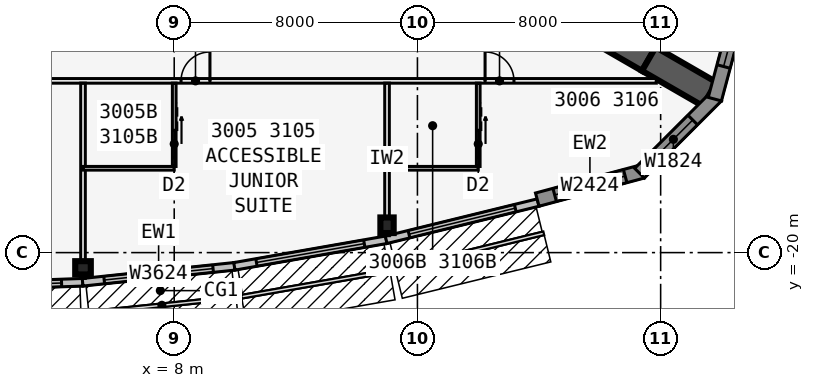
"""IFC4 building model, lengths in metres.
Left out: names, types, materials, properties, quantities, classifications, styles, units other than length and angle.
Written with IfcOpenShell. Run it as: python <this file> out.ifc"""

import sys

from ifc_helpers import new_model, si_unit, direction, frame, frame_2d, origin, origin_2d, place, context, subcontext, project, spatial, polyline, rectangle, i_section, outline, extrude, element, fill, save


model = new_model("IFC4")
c1 = context("Model", 3, precision=1e-05, world=origin(), true_north=direction((0.0, 1.0)))
c2 = subcontext(c1, "Body", "Model", "MODEL_VIEW")
j1 = project(units=[si_unit("LENGTHUNIT", "METRE"), si_unit("PLANEANGLEUNIT", "RADIAN")], contexts=[c1])
p1 = place(None, origin())
s1 = spatial("IfcSite", under=j1, at=p1, CompositionType="ELEMENT")
p2 = place(p1, origin())
s2 = spatial("IfcBuilding", under=s1, at=p2, CompositionType="ELEMENT")
p3 = place(p2, frame((0.0, 0.0, 118.1)))
s3 = spatial("IfcBuildingStorey", under=s2, at=p3, CompositionType="ELEMENT", Elevation=118.1)
for number, where, z_axis, x_axis in (
    (1, (21.61, -12.477, 0.0), (0.0, 0.0, 1.0), (0.866, -0.5, 0.0)),
    (2, (23.61, -13.631, 0.0), (0.0, 0.0, 1.0), (0.866, -0.5, 0.0)),
):
    element("IfcWall", number, at=place(p3, frame(where, z_axis=z_axis, x_axis=x_axis)), inside=s3, PredefinedType="SHEAR", context=c2, shape_type="SweptSolid", body=[
        extrude(rectangle(XDim=2.309, YDim=0.9, at=frame_2d((1.155, 0.0))), origin(), (0.0, 0.0, 1.0), 3.4),
    ])
for number, where, z_axis, x_axis in (
    (3, (5.0, -20.5, 0.0), (0.0, 0.0, 1.0), (0.0, -1.0, 0.0)),
    (4, (15.0, -19.1, 0.0), (0.0, 0.0, 1.0), (1.0, 0.0, 0.0)),
):
    element("IfcColumn", number, at=place(p3, frame(where, z_axis=z_axis, x_axis=x_axis)), inside=s3, PredefinedType="COLUMN", context=c2, shape_type="SweptSolid", body=[
        extrude(i_section(OverallWidth=0.437, OverallDepth=0.513, WebThickness=0.061, FlangeThickness=0.097, at=origin_2d()), origin(), (0.0, 0.0, 1.0), 3.4),
    ])
p4 = place(p3, frame((-0.004, -21.15, 0.0), z_axis=(0.0, 0.0, 1.0), x_axis=(0.999387720943, 0.034988329879, 0.0)))
e5 = element("IfcWall", 5, at=p4, inside=s3, PredefinedType="STANDARD", context=c2, shape_type="SweptSolid", body=[
    extrude(rectangle(XDim=5.003, YDim=0.25, at=frame_2d((2.501, 0.0))), origin(), (0.0, 0.0, 1.0), 3.235),
])
p5 = place(p4, frame((0.701, 0.0, 0.45)))
e6 = element("IfcOpeningElement", 6, at=p5, cuts=e5, PredefinedType="OPENING", context=c2, shape_type="SweptSolid", body=[
    extrude(rectangle(XDim=3.6, YDim=2.4, at=frame_2d((1.8, 1.2))), frame((0.0, 0.135, 0.0), z_axis=(0.0, -1.0, 0.0), x_axis=(1.0, 0.0, 0.0)), (0.0, 0.0, 1.0), 0.27),
])
p6 = place(p3, frame((4.987, -20.976, 0.0), z_axis=(0.0, 0.0, 1.0), x_axis=(0.994534683851, 0.104406717299, 0.0)))
e7 = element("IfcWall", 7, at=p6, inside=s3, PredefinedType="STANDARD", context=c2, shape_type="SweptSolid", body=[
    extrude(rectangle(XDim=5.028, YDim=0.25, at=frame_2d((2.514, 0.0))), origin(), (0.0, 0.0, 1.0), 3.235),
])
p7 = place(p6, frame((0.714, 0.0, 0.45)))
e8 = element("IfcOpeningElement", 8, at=p7, cuts=e7, PredefinedType="OPENING", context=c2, shape_type="SweptSolid", body=[
    extrude(rectangle(XDim=3.6, YDim=2.4, at=frame_2d((1.8, 1.2))), frame((0.0, 0.135, 0.0), z_axis=(0.0, -1.0, 0.0), x_axis=(1.0, 0.0, 0.0)), (0.0, 0.0, 1.0), 0.27),
])
p8 = place(p3, frame((9.979, -20.452, 0.0), z_axis=(0.0, 0.0, 1.0), x_axis=(0.985030467156, 0.172380331752, 0.0)))
e9 = element("IfcWall", 9, at=p8, inside=s3, PredefinedType="STANDARD", context=c2, shape_type="SweptSolid", body=[
    extrude(rectangle(XDim=5.076, YDim=0.25, at=frame_2d((2.538, 0.0))), origin(), (0.0, 0.0, 1.0), 3.235),
])
p9 = place(p8, frame((0.738, 0.0, 0.45)))
e10 = element("IfcOpeningElement", 10, at=p9, cuts=e9, PredefinedType="OPENING", context=c2, shape_type="SweptSolid", body=[
    extrude(rectangle(XDim=3.6, YDim=2.4, at=frame_2d((1.8, 1.2))), frame((0.0, 0.135, 0.0), z_axis=(0.0, -1.0, 0.0), x_axis=(1.0, 0.0, 0.0)), (0.0, 0.0, 1.0), 0.27),
])
p10 = place(p3, frame((14.97, -19.579, 0.0), z_axis=(0.0, 0.0, 1.0), x_axis=(0.971270024053, 0.237980126011, 0.0)))
e11 = element("IfcWall", 11, at=p10, inside=s3, PredefinedType="STANDARD", context=c2, shape_type="SweptSolid", body=[
    extrude(rectangle(XDim=5.148, YDim=0.25, at=frame_2d((2.574, 0.0))), origin(), (0.0, 0.0, 1.0), 3.235),
])
p11 = place(p10, frame((0.774, 0.0, 0.45)))
e12 = element("IfcOpeningElement", 12, at=p11, cuts=e11, PredefinedType="OPENING", context=c2, shape_type="SweptSolid", body=[
    extrude(rectangle(XDim=3.6, YDim=2.4, at=frame_2d((1.8, 1.2))), frame((0.0, 0.135, 0.0), z_axis=(0.0, -1.0, 0.0), x_axis=(1.0, 0.0, 0.0)), (0.0, 0.0, 1.0), 0.27),
])
p12 = place(p3, frame((19.942, -18.258, 0.0), z_axis=(0.0, 0.0, 1.0), x_axis=(0.965924653531, 0.258823421857, 0.0)))
e13 = element("IfcWall", 13, at=p12, inside=s3, PredefinedType="SOLIDWALL", context=c2, shape_type="SweptSolid", body=[
    extrude(rectangle(XDim=3.586, YDim=0.45, at=frame_2d((1.793, 0.0))), origin(), (0.0, 0.0, 1.0), 3.235),
])
p13 = place(p12, frame((0.593, 0.0, 0.45)))
e14 = element("IfcOpeningElement", 14, at=p13, cuts=e13, PredefinedType="OPENING", context=c2, shape_type="SweptSolid", body=[
    extrude(rectangle(XDim=2.4, YDim=2.4, at=frame_2d((1.2, 1.2))), frame((0.0, 0.235, 0.0), z_axis=(0.0, -1.0, 0.0), x_axis=(1.0, 0.0, 0.0)), (0.0, 0.0, 1.0), 0.47),
])
p14 = place(p3, frame((23.305, -17.388, 0.0), z_axis=(0.0, 0.0, 1.0), x_axis=(0.707106781187, 0.707106781187, 0.0)))
e15 = element("IfcWall", 15, at=p14, inside=s3, PredefinedType="SOLIDWALL", context=c2, shape_type="SweptSolid", body=[
    extrude(outline(polyline([(3.586, 0.225), (3.527, 0.225), (3.035, 0.093), (3.0, 0.225), (0.0, 0.225), (0.0, -0.225), (3.586, -0.225), (3.586, 0.225)])), origin(), (0.0, 0.0, 1.0), 3.235),
])
p15 = place(p14, frame((0.675, 0.0, 0.45)))
e16 = element("IfcOpeningElement", 16, at=p15, cuts=e15, PredefinedType="OPENING", context=c2, shape_type="SweptSolid", body=[
    extrude(rectangle(XDim=1.8, YDim=2.4, at=frame_2d((0.9, 1.2))), frame((0.0, 0.235, 0.0), z_axis=(0.0, -1.0, 0.0), x_axis=(1.0, 0.0, 0.0)), (0.0, 0.0, 1.0), 0.47),
])
p16 = place(p3, frame((25.783, -14.953, 0.0), z_axis=(0.0, 0.0, 1.0), x_axis=(0.258823421857, 0.965924653531, 0.0)))
e17 = element("IfcWall", 17, at=p16, inside=s3, PredefinedType="SOLIDWALL", context=c2, shape_type="SweptSolid", body=[
    extrude(outline(polyline([(3.586, 0.225), (0.586, 0.225), (0.551, 0.093), (0.06, 0.225), (0.0, 0.225), (0.0, -0.225), (3.586, -0.225), (3.586, 0.225)])), origin(), (0.0, 0.0, 1.0), 3.235),
])
p17 = place(p16, frame((1.111, 0.0, 0.45)))
e18 = element("IfcOpeningElement", 18, at=p17, cuts=e17, PredefinedType="OPENING", context=c2, shape_type="SweptSolid", body=[
    extrude(rectangle(XDim=1.8, YDim=2.4, at=frame_2d((0.9, 1.2))), frame((0.0, 0.235, 0.0), z_axis=(0.0, -1.0, 0.0), x_axis=(1.0, 0.0, 0.0)), (0.0, 0.0, 1.0), 0.47),
])
p18 = place(p3, frame((-23.857, -14.351, 0.0), z_axis=(0.0, 0.0, 1.0), x_axis=(1.0, 0.0, 0.0)))
e19 = element("IfcWall", 19, at=p18, inside=s3, PredefinedType="PARTITIONING", context=c2, shape_type="SweptSolid", body=[
    extrude(rectangle(XDim=47.714, YDim=0.15, at=frame_2d((23.857, 0.0))), origin(), (0.0, 0.0, 1.0), 3.235),
])
p19 = place(p18, frame((4.682, 0.0, 0.0)))
e20 = element("IfcOpeningElement", 20, at=p19, cuts=e19, PredefinedType="OPENING", context=c2, shape_type="SweptSolid", body=[
    extrude(rectangle(XDim=0.95, YDim=2.13, at=frame_2d((0.475, 1.065))), frame((0.0, 0.085, 0.0), z_axis=(0.0, -1.0, 0.0), x_axis=(1.0, 0.0, 0.0)), (0.0, 0.0, 1.0), 0.17),
])
p20 = place(p18, frame((11.482, 0.0, 0.0)))
e21 = element("IfcOpeningElement", 21, at=p20, cuts=e19, PredefinedType="OPENING", context=c2, shape_type="SweptSolid", body=[
    extrude(rectangle(XDim=0.95, YDim=2.13, at=frame_2d((0.475, 1.065))), frame((0.0, 0.085, 0.0), z_axis=(0.0, -1.0, 0.0), x_axis=(1.0, 0.0, 0.0)), (0.0, 0.0, 1.0), 0.17),
])
p21 = place(p18, frame((16.482, 0.0, 0.0)))
e22 = element("IfcOpeningElement", 22, at=p21, cuts=e19, PredefinedType="OPENING", context=c2, shape_type="SweptSolid", body=[
    extrude(rectangle(XDim=0.95, YDim=2.13, at=frame_2d((0.475, 1.065))), frame((0.0, 0.085, 0.0), z_axis=(0.0, -1.0, 0.0), x_axis=(1.0, 0.0, 0.0)), (0.0, 0.0, 1.0), 0.17),
])
p22 = place(p18, frame((21.482, 0.0, 0.0)))
e23 = element("IfcOpeningElement", 23, at=p22, cuts=e19, PredefinedType="OPENING", context=c2, shape_type="SweptSolid", body=[
    extrude(rectangle(XDim=0.95, YDim=2.13, at=frame_2d((0.475, 1.065))), frame((0.0, 0.085, 0.0), z_axis=(0.0, -1.0, 0.0), x_axis=(1.0, 0.0, 0.0)), (0.0, 0.0, 1.0), 0.17),
])
p23 = place(p18, frame((25.857, 0.0, 0.0)))
e24 = element("IfcOpeningElement", 24, at=p23, cuts=e19, PredefinedType="OPENING", context=c2, shape_type="SweptSolid", body=[
    extrude(rectangle(XDim=1.0, YDim=2.13, at=frame_2d((0.5, 1.065))), frame((0.0, 0.085, 0.0), z_axis=(0.0, -1.0, 0.0), x_axis=(1.0, 0.0, 0.0)), (0.0, 0.0, 1.0), 0.17),
])
p24 = place(p18, frame((32.082, 0.0, 0.0)))
e25 = element("IfcOpeningElement", 25, at=p24, cuts=e19, PredefinedType="OPENING", context=c2, shape_type="SweptSolid", body=[
    extrude(rectangle(XDim=0.95, YDim=2.13, at=frame_2d((0.475, 1.065))), frame((0.0, 0.085, 0.0), z_axis=(0.0, -1.0, 0.0), x_axis=(1.0, 0.0, 0.0)), (0.0, 0.0, 1.0), 0.17),
])
p25 = place(p18, frame((42.082, 0.0, 0.0)))
e26 = element("IfcOpeningElement", 26, at=p25, cuts=e19, PredefinedType="OPENING", context=c2, shape_type="SweptSolid", body=[
    extrude(rectangle(XDim=0.95, YDim=2.13, at=frame_2d((0.475, 1.065))), frame((0.0, 0.085, 0.0), z_axis=(0.0, -1.0, 0.0), x_axis=(1.0, 0.0, 0.0)), (0.0, 0.0, 1.0), 0.17),
])
p26 = place(p3, frame((5.0, -14.426, 0.0), z_axis=(0.0, 0.0, 1.0), x_axis=(0.0, -1.0, 0.0)))
e27 = element("IfcWall", 27, at=p26, inside=s3, PredefinedType="PARTITIONING", context=c2, shape_type="SweptSolid", body=[
    extrude(rectangle(XDim=6.423, YDim=0.15, at=frame_2d((3.211, 0.0))), origin(), (0.0, 0.0, 1.0), 2.389),
])
p27 = place(p3, frame((15.0, -14.426, 0.0), z_axis=(0.0, 0.0, 1.0), x_axis=(0.0, -1.0, 0.0)))
e28 = element("IfcWall", 28, at=p27, inside=s3, PredefinedType="PARTITIONING", context=c2, shape_type="SweptSolid", body=[
    extrude(rectangle(XDim=5.017, YDim=0.15, at=frame_2d((2.508, 0.0))), origin(), (0.0, 0.0, 1.0), 2.389),
])
p28 = place(p3, frame((5.0, -17.226, 0.0), z_axis=(0.0, 0.0, 1.0), x_axis=(1.0, 0.0, 0.0)))
e29 = element("IfcWall", 29, at=p28, inside=s3, PredefinedType="PLUMBINGWALL", context=c2, shape_type="SweptSolid", body=[
    extrude(rectangle(XDim=3.0, YDim=0.12, at=frame_2d((1.5, 0.0))), origin(), (0.0, 0.0, 1.0), 3.235),
])
p29 = place(p3, frame((8.0, -14.426, 0.0), z_axis=(0.0, 0.0, 1.0), x_axis=(0.0, -1.0, 0.0)))
e30 = element("IfcWall", 30, at=p29, inside=s3, PredefinedType="PLUMBINGWALL", context=c2, shape_type="SweptSolid", body=[
    extrude(rectangle(XDim=2.74, YDim=0.12, at=frame_2d((1.37, 0.0))), origin(), (0.0, 0.0, 1.0), 3.235),
])
p30 = place(p29, frame((1.55, 0.0, 0.0)))
e31 = element("IfcOpeningElement", 31, at=p30, cuts=e30, PredefinedType="OPENING", context=c2, shape_type="SweptSolid", body=[
    extrude(rectangle(XDim=0.9, YDim=2.13, at=frame_2d((0.45, 1.065))), frame((0.0, 0.07, 0.0), z_axis=(0.0, -1.0, 0.0), x_axis=(1.0, 0.0, 0.0)), (0.0, 0.0, 1.0), 0.14),
])
p31 = place(p3, frame((15.0, -17.226, 0.0), z_axis=(0.0, 0.0, 1.0), x_axis=(1.0, 0.0, 0.0)))
e32 = element("IfcWall", 32, at=p31, inside=s3, PredefinedType="PLUMBINGWALL", context=c2, shape_type="SweptSolid", body=[
    extrude(rectangle(XDim=3.0, YDim=0.12, at=frame_2d((1.5, 0.0))), origin(), (0.0, 0.0, 1.0), 3.235),
])
p32 = place(p3, frame((18.0, -14.426, 0.0), z_axis=(0.0, 0.0, 1.0), x_axis=(0.0, -1.0, 0.0)))
e33 = element("IfcWall", 33, at=p32, inside=s3, PredefinedType="PLUMBINGWALL", context=c2, shape_type="SweptSolid", body=[
    extrude(rectangle(XDim=2.74, YDim=0.12, at=frame_2d((1.37, 0.0))), origin(), (0.0, 0.0, 1.0), 3.235),
])
p33 = place(p32, frame((1.55, 0.0, 0.0)))
e34 = element("IfcOpeningElement", 34, at=p33, cuts=e33, PredefinedType="OPENING", context=c2, shape_type="SweptSolid", body=[
    extrude(rectangle(XDim=0.9, YDim=2.13, at=frame_2d((0.45, 1.065))), frame((0.0, 0.07, 0.0), z_axis=(0.0, -1.0, 0.0), x_axis=(1.0, 0.0, 0.0)), (0.0, 0.0, 1.0), 0.14),
])
p34 = place(p5, origin())
e35 = element("IfcWindow", 35, at=p34, inside=s3, PartitioningType="SINGLE_PANEL", PredefinedType="WINDOW", context=c2, shape_type="SweptSolid", body=[
    extrude(rectangle(XDim=3.6, YDim=2.4, at=frame_2d((1.8, 1.2))), frame((0.0, 0.03, 0.0), z_axis=(0.0, -1.0, 0.0), x_axis=(1.0, 0.0, 0.0)), (0.0, 0.0, 1.0), 0.06),
])
fill(e6, e35)
p35 = place(p7, origin())
e36 = element("IfcWindow", 36, at=p35, inside=s3, PartitioningType="SINGLE_PANEL", PredefinedType="WINDOW", context=c2, shape_type="SweptSolid", body=[
    extrude(rectangle(XDim=3.6, YDim=2.4, at=frame_2d((1.8, 1.2))), frame((0.0, 0.03, 0.0), z_axis=(0.0, -1.0, 0.0), x_axis=(1.0, 0.0, 0.0)), (0.0, 0.0, 1.0), 0.06),
])
fill(e8, e36)
p36 = place(p9, origin())
e37 = element("IfcWindow", 37, at=p36, inside=s3, PartitioningType="SINGLE_PANEL", PredefinedType="WINDOW", context=c2, shape_type="SweptSolid", body=[
    extrude(rectangle(XDim=3.6, YDim=2.4, at=frame_2d((1.8, 1.2))), frame((0.0, 0.03, 0.0), z_axis=(0.0, -1.0, 0.0), x_axis=(1.0, 0.0, 0.0)), (0.0, 0.0, 1.0), 0.06),
])
fill(e10, e37)
p37 = place(p11, origin())
e38 = element("IfcWindow", 38, at=p37, inside=s3, PartitioningType="SINGLE_PANEL", PredefinedType="WINDOW", context=c2, shape_type="SweptSolid", body=[
    extrude(rectangle(XDim=3.6, YDim=2.4, at=frame_2d((1.8, 1.2))), frame((0.0, 0.03, 0.0), z_axis=(0.0, -1.0, 0.0), x_axis=(1.0, 0.0, 0.0)), (0.0, 0.0, 1.0), 0.06),
])
fill(e12, e38)
p38 = place(p13, origin())
e39 = element("IfcWindow", 39, at=p38, inside=s3, PartitioningType="SINGLE_PANEL", PredefinedType="WINDOW", context=c2, shape_type="SweptSolid", body=[
    extrude(rectangle(XDim=2.4, YDim=2.4, at=frame_2d((1.2, 1.2))), frame((0.0, 0.03, 0.0), z_axis=(0.0, -1.0, 0.0), x_axis=(1.0, 0.0, 0.0)), (0.0, 0.0, 1.0), 0.06),
])
fill(e14, e39)
p39 = place(p15, origin())
e40 = element("IfcWindow", 40, at=p39, inside=s3, PartitioningType="SINGLE_PANEL", PredefinedType="WINDOW", context=c2, shape_type="SweptSolid", body=[
    extrude(rectangle(XDim=1.8, YDim=2.4, at=frame_2d((0.9, 1.2))), frame((0.0, 0.03, 0.0), z_axis=(0.0, -1.0, 0.0), x_axis=(1.0, 0.0, 0.0)), (0.0, 0.0, 1.0), 0.06),
])
fill(e16, e40)
p40 = place(p17, origin())
e41 = element("IfcWindow", 41, at=p40, inside=s3, PartitioningType="SINGLE_PANEL", PredefinedType="WINDOW", context=c2, shape_type="SweptSolid", body=[
    extrude(rectangle(XDim=1.8, YDim=2.4, at=frame_2d((0.9, 1.2))), frame((0.0, 0.03, 0.0), z_axis=(0.0, -1.0, 0.0), x_axis=(1.0, 0.0, 0.0)), (0.0, 0.0, 1.0), 0.06),
])
fill(e18, e41)
p41 = place(p30, origin())
e42 = element("IfcDoor", 42, at=p41, inside=s3, OperationType="SLIDING_TO_LEFT", PredefinedType="DOOR", context=c2, shape_type="SweptSolid", body=[
    extrude(rectangle(XDim=0.9, YDim=2.13, at=frame_2d((0.45, 1.065))), frame((0.0, 0.025, 0.0), z_axis=(0.0, -1.0, 0.0), x_axis=(1.0, 0.0, 0.0)), (0.0, 0.0, 1.0), 0.05),
])
fill(e31, e42)
p42 = place(p24, origin())
e43 = element("IfcDoor", 43, at=p42, inside=s3, OperationType="SINGLE_SWING_RIGHT", PredefinedType="DOOR", context=c2, shape_type="SweptSolid", body=[
    extrude(rectangle(XDim=0.95, YDim=2.13, at=frame_2d((0.475, 1.065))), frame((0.0, 0.025, 0.0), z_axis=(0.0, -1.0, 0.0), x_axis=(1.0, 0.0, 0.0)), (0.0, 0.0, 1.0), 0.05),
])
fill(e25, e43)
p43 = place(p33, origin())
e44 = element("IfcDoor", 44, at=p43, inside=s3, OperationType="SLIDING_TO_LEFT", PredefinedType="DOOR", context=c2, shape_type="SweptSolid", body=[
    extrude(rectangle(XDim=0.9, YDim=2.13, at=frame_2d((0.45, 1.065))), frame((0.0, 0.025, 0.0), z_axis=(0.0, -1.0, 0.0), x_axis=(1.0, 0.0, 0.0)), (0.0, 0.0, 1.0), 0.05),
])
fill(e34, e44)
p44 = place(p25, origin())
e45 = element("IfcDoor", 45, at=p44, inside=s3, OperationType="SINGLE_SWING_LEFT", PredefinedType="DOOR", context=c2, shape_type="SweptSolid", body=[
    extrude(rectangle(XDim=0.95, YDim=2.13, at=frame_2d((0.475, 1.065))), frame((0.0, 0.025, 0.0), z_axis=(0.0, -1.0, 0.0), x_axis=(1.0, 0.0, 0.0)), (0.0, 0.0, 1.0), 0.05),
])
fill(e26, e45)
save(model, sys.argv[1])
